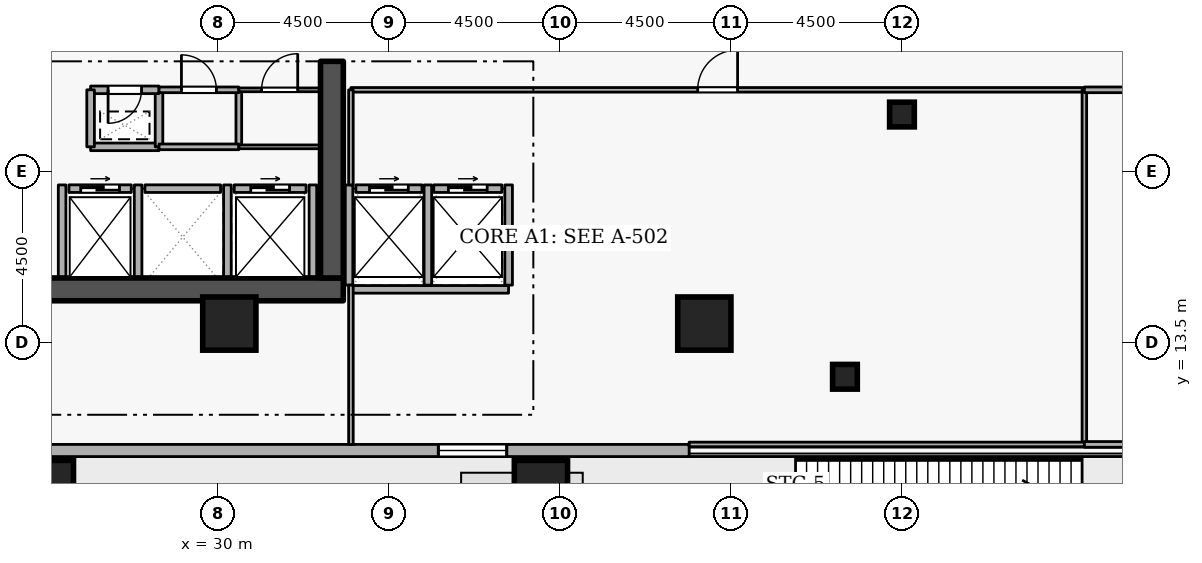
"""IFC4 building model, lengths in metres.
Left out: names, types, materials, properties, quantities, classifications, styles, units other than length and angle.
Written with IfcOpenShell. Run it as: python <this file> out.ifc"""

import sys

from ifc_helpers import new_model, si_unit, direction, frame, frame_2d, origin, origin_2d, place, context, subcontext, project, spatial, rectangle, extrude, element, fill, save


model = new_model("IFC4")
c1 = context("Model", 3, precision=1e-05, world=origin(), true_north=direction((0.0, 1.0)))
c2 = subcontext(c1, "Body", "Model", "MODEL_VIEW")
j1 = project(units=[si_unit("LENGTHUNIT", "METRE"), si_unit("PLANEANGLEUNIT", "RADIAN")], contexts=[c1])
p1 = place(None, origin())
s1 = spatial("IfcSite", under=j1, at=p1, CompositionType="ELEMENT")
p2 = place(p1, origin())
s2 = spatial("IfcBuilding", under=s1, at=p2, CompositionType="ELEMENT")
p3 = place(p2, frame((0.0, 0.0, 18.6)))
s3 = spatial("IfcBuildingStorey", under=s2, at=p3, CompositionType="ELEMENT", Elevation=18.6)
p4 = place(p3, frame((17.7, 14.9, 0.0), z_axis=(0.0, 0.0, 1.0), x_axis=(1.0, 0.0, 0.0)))
e1 = element("IfcWall", 1, at=p4, inside=s3, PredefinedType="SHEAR", context=c2, shape_type="SweptSolid", body=[
    extrude(rectangle(XDim=15.6, YDim=0.6, at=frame_2d((7.8, 0.0))), origin(), (0.0, 0.0, 1.0), 4.5),
])
p5 = place(p3, frame((33.0, 15.2, 0.0), z_axis=(0.0, 0.0, 1.0), x_axis=(0.0, 1.0, 0.0)))
e2 = element("IfcWall", 2, at=p5, inside=s3, PredefinedType="SHEAR", context=c2, shape_type="SweptSolid", body=[
    extrude(rectangle(XDim=5.7, YDim=0.6, at=frame_2d((2.85, 0.0))), origin(), (0.0, 0.0, 1.0), 4.5),
])
for number, where, z_axis, x_axis in (
    (3, (25.5, 9.7, 0.0), (0.0, 0.0, 1.0), (1.0, 0.0, 0.0)),
    (4, (38.5, 9.7, 0.0), (0.0, 0.0, 1.0), (1.0, 0.0, 0.0)),
    (5, (42.8, 14.0, 0.0), (0.0, 0.0, 1.0), (1.0, 0.0, 0.0)),
    (6, (30.3, 14.0, 0.0), (0.0, 0.0, 1.0), (1.0, 0.0, 0.0)),
):
    element("IfcColumn", number, at=place(p3, frame(where, z_axis=z_axis, x_axis=x_axis)), inside=s3, PredefinedType="COLUMN", context=c2, shape_type="SweptSolid", body=[
        extrude(rectangle(XDim=1.4, YDim=1.4, at=origin_2d()), origin(), (0.0, 0.0, 1.0), 4.5),
    ])
for number, where, z_axis, x_axis in (
    (7, (46.5, 12.6, 0.0), (0.0, 0.0, 1.0), (1.0, 0.0, 0.0)),
    (8, (48.0, 19.5, 0.0), (0.0, 0.0, 1.0), (1.0, 0.0, 0.0)),
):
    element("IfcColumn", number, at=place(p3, frame(where, z_axis=z_axis, x_axis=x_axis)), inside=s3, PredefinedType="COLUMN", context=c2, shape_type="SweptSolid", body=[
        extrude(rectangle(XDim=0.65, YDim=0.65, at=origin_2d()), origin(), (0.0, 0.0, 1.0), 4.5),
    ])
p6 = place(p3, frame((3.0, 10.66, 0.0), z_axis=(0.0, 0.0, 1.0), x_axis=(1.0, 0.0, 0.0)))
e9 = element("IfcWall", 9, at=p6, inside=s3, PredefinedType="STANDARD", context=c2, shape_type="SweptSolid", body=[
    extrude(rectangle(XDim=39.4, YDim=0.32, at=frame_2d((19.7, 0.0))), origin(), (0.0, 0.0, 1.0), 3.56),
])
p7 = place(p6, frame((6.2, 0.0, 0.0)))
e10 = element("IfcOpeningElement", 10, at=p7, cuts=e9, PredefinedType="OPENING", context=c2, shape_type="SweptSolid", body=[
    extrude(rectangle(XDim=1.15, YDim=2.1, at=frame_2d((0.575, 1.05))), frame((0.0, 0.17, 0.0), z_axis=(0.0, -1.0, 0.0), x_axis=(1.0, 0.0, 0.0)), (0.0, 0.0, 1.0), 0.34),
])
p8 = place(p6, frame((3.0, 0.0, 0.78)))
e11 = element("IfcOpeningElement", 11, at=p8, cuts=e9, PredefinedType="OPENING", context=c2, shape_type="SweptSolid", body=[
    extrude(rectangle(XDim=1.8, YDim=2.15, at=frame_2d((0.9, 1.075))), frame((0.0, 0.17, 0.0), z_axis=(0.0, -1.0, 0.0), x_axis=(1.0, 0.0, 0.0)), (0.0, 0.0, 1.0), 0.34),
])
p9 = place(p6, frame((12.8, 0.0, 0.78)))
e12 = element("IfcOpeningElement", 12, at=p9, cuts=e9, PredefinedType="OPENING", context=c2, shape_type="SweptSolid", body=[
    extrude(rectangle(XDim=1.8, YDim=2.15, at=frame_2d((0.9, 1.075))), frame((0.0, 0.17, 0.0), z_axis=(0.0, -1.0, 0.0), x_axis=(1.0, 0.0, 0.0)), (0.0, 0.0, 1.0), 0.34),
])
p10 = place(p6, frame((32.8, 0.0, 0.78)))
e13 = element("IfcOpeningElement", 13, at=p10, cuts=e9, PredefinedType="OPENING", context=c2, shape_type="SweptSolid", body=[
    extrude(rectangle(XDim=1.8, YDim=2.15, at=frame_2d((0.9, 1.075))), frame((0.0, 0.17, 0.0), z_axis=(0.0, -1.0, 0.0), x_axis=(1.0, 0.0, 0.0)), (0.0, 0.0, 1.0), 0.34),
])
p11 = place(p3, frame((26.08, 17.55, 0.0), z_axis=(0.0, 0.0, 1.0), x_axis=(1.0, 0.0, 0.0)))
e14 = element("IfcWall", 14, at=p11, inside=s3, PredefinedType="STANDARD", context=c2, shape_type="SweptSolid", body=[
    extrude(rectangle(XDim=1.64, YDim=0.2, at=frame_2d((0.82, 0.0))), origin(), (0.0, 0.0, 1.0), 4.16),
])
p12 = place(p11, frame((0.31, 0.0, 0.0)))
e15 = element("IfcOpeningElement", 15, at=p12, cuts=e14, PredefinedType="OPENING", context=c2, shape_type="SweptSolid", body=[
    extrude(rectangle(XDim=1.02, YDim=2.06, at=frame_2d((0.51, 1.03))), frame((0.0, 0.11, 0.0), z_axis=(0.0, -1.0, 0.0), x_axis=(1.0, 0.0, 0.0)), (0.0, 0.0, 1.0), 0.22),
])
p13 = place(p3, frame((28.08, 17.55, 0.0), z_axis=(0.0, 0.0, 1.0), x_axis=(1.0, 0.0, 0.0)))
e16 = element("IfcWall", 16, at=p13, inside=s3, PredefinedType="STANDARD", context=c2, shape_type="SweptSolid", body=[
    extrude(rectangle(XDim=1.99, YDim=0.2, at=frame_2d((0.995, 0.0))), origin(), (0.0, 0.0, 1.0), 4.16),
])
p14 = place(p3, frame((30.43, 17.55, 0.0), z_axis=(0.0, 0.0, 1.0), x_axis=(1.0, 0.0, 0.0)))
e17 = element("IfcWall", 17, at=p14, inside=s3, PredefinedType="STANDARD", context=c2, shape_type="SweptSolid", body=[
    extrude(rectangle(XDim=1.89, YDim=0.2, at=frame_2d((0.945, 0.0))), origin(), (0.0, 0.0, 1.0), 4.16),
])
p15 = place(p14, frame((0.435, 0.0, 0.0)))
e18 = element("IfcOpeningElement", 18, at=p15, cuts=e17, PredefinedType="OPENING", context=c2, shape_type="SweptSolid", body=[
    extrude(rectangle(XDim=1.02, YDim=2.06, at=frame_2d((0.51, 1.03))), frame((0.0, 0.11, 0.0), z_axis=(0.0, -1.0, 0.0), x_axis=(1.0, 0.0, 0.0)), (0.0, 0.0, 1.0), 0.22),
])
p16 = place(p3, frame((33.63, 17.55, 0.0), z_axis=(0.0, 0.0, 1.0), x_axis=(1.0, 0.0, 0.0)))
e19 = element("IfcWall", 19, at=p16, inside=s3, PredefinedType="STANDARD", context=c2, shape_type="SweptSolid", body=[
    extrude(rectangle(XDim=1.74, YDim=0.2, at=frame_2d((0.87, 0.0))), origin(), (0.0, 0.0, 1.0), 4.16),
])
p17 = place(p16, frame((0.36, 0.0, 0.0)))
e20 = element("IfcOpeningElement", 20, at=p17, cuts=e19, PredefinedType="OPENING", context=c2, shape_type="SweptSolid", body=[
    extrude(rectangle(XDim=1.02, YDim=2.06, at=frame_2d((0.51, 1.03))), frame((0.0, 0.11, 0.0), z_axis=(0.0, -1.0, 0.0), x_axis=(1.0, 0.0, 0.0)), (0.0, 0.0, 1.0), 0.22),
])
p18 = place(p3, frame((35.68, 17.55, 0.0), z_axis=(0.0, 0.0, 1.0), x_axis=(1.0, 0.0, 0.0)))
e21 = element("IfcWall", 21, at=p18, inside=s3, PredefinedType="STANDARD", context=c2, shape_type="SweptSolid", body=[
    extrude(rectangle(XDim=1.79, YDim=0.2, at=frame_2d((0.895, 0.0))), origin(), (0.0, 0.0, 1.0), 4.16),
])
p19 = place(p18, frame((0.385, 0.0, 0.0)))
e22 = element("IfcOpeningElement", 22, at=p19, cuts=e21, PredefinedType="OPENING", context=c2, shape_type="SweptSolid", body=[
    extrude(rectangle(XDim=1.02, YDim=2.06, at=frame_2d((0.51, 1.03))), frame((0.0, 0.11, 0.0), z_axis=(0.0, -1.0, 0.0), x_axis=(1.0, 0.0, 0.0)), (0.0, 0.0, 1.0), 0.22),
])
for number, where, z_axis, x_axis in (
    (23, (27.9, 15.212, 0.0), (0.0, 0.0, 1.0), (0.0, 1.0, 0.0)),
    (24, (25.9, 15.212, 0.0), (0.0, 0.0, 1.0), (0.0, 1.0, 0.0)),
    (25, (30.25, 15.212, 0.0), (0.0, 0.0, 1.0), (0.0, 1.0, 0.0)),
    (26, (32.5, 15.212, 0.0), (0.0, 0.0, 1.0), (0.0, 1.0, 0.0)),
):
    element("IfcWall", number, at=place(p3, frame(where, z_axis=z_axis, x_axis=x_axis)), inside=s3, PredefinedType="STANDARD", context=c2, shape_type="SweptSolid", body=[
        extrude(rectangle(XDim=2.436, YDim=0.2, at=frame_2d((1.218, 0.0))), origin(), (0.0, 0.0, 1.0), 4.16),
    ])
p20 = place(p3, frame((33.452, 14.9, 0.0), z_axis=(0.0, 0.0, 1.0), x_axis=(1.0, 0.0, 0.0)))
e27 = element("IfcWall", 27, at=p20, inside=s3, PredefinedType="STANDARD", context=c2, shape_type="SweptSolid", body=[
    extrude(rectangle(XDim=4.196, YDim=0.2, at=frame_2d((2.098, 0.0))), origin(), (0.0, 0.0, 1.0), 4.16),
])
for number, where, z_axis, x_axis in (
    (28, (35.525, 15.012, 0.0), (0.0, 0.0, 1.0), (0.0, 1.0, 0.0)),
    (29, (33.45, 15.012, 0.0), (0.0, 0.0, 1.0), (0.0, 1.0, 0.0)),
    (30, (37.65, 15.012, 0.0), (0.0, 0.0, 1.0), (0.0, 1.0, 0.0)),
):
    element("IfcWall", number, at=place(p3, frame(where, z_axis=z_axis, x_axis=x_axis)), inside=s3, PredefinedType="STANDARD", context=c2, shape_type="SweptSolid", body=[
        extrude(rectangle(XDim=2.636, YDim=0.2, at=frame_2d((1.318, 0.0))), origin(), (0.0, 0.0, 1.0), 4.16),
    ])
p21 = place(p3, frame((26.65, 18.65, 0.0), z_axis=(0.0, 0.0, 1.0), x_axis=(1.0, 0.0, 0.0)))
e31 = element("IfcWall", 31, at=p21, inside=s3, PredefinedType="STANDARD", context=c2, shape_type="SweptSolid", body=[
    extrude(rectangle(XDim=1.8, YDim=0.2, at=frame_2d((0.9, 0.0))), origin(), (0.0, 0.0, 1.0), 4.16),
])
p22 = place(p3, frame((28.45, 18.65, 0.0), z_axis=(0.0, 0.0, 1.0), x_axis=(0.0, 1.0, 0.0)))
e32 = element("IfcWall", 32, at=p22, inside=s3, PredefinedType="STANDARD", context=c2, shape_type="SweptSolid", body=[
    extrude(rectangle(XDim=1.5, YDim=0.2, at=frame_2d((0.75, 0.0))), origin(), (0.0, 0.0, 1.0), 4.16),
])
p23 = place(p3, frame((28.45, 20.15, 0.0), z_axis=(0.0, 0.0, 1.0), x_axis=(-1.0, 0.0, 0.0)))
e33 = element("IfcWall", 33, at=p23, inside=s3, PredefinedType="STANDARD", context=c2, shape_type="SweptSolid", body=[
    extrude(rectangle(XDim=1.8, YDim=0.2, at=frame_2d((0.9, 0.0))), origin(), (0.0, 0.0, 1.0), 4.16),
])
p24 = place(p23, frame((0.46, 0.0, 0.0)))
e34 = element("IfcOpeningElement", 34, at=p24, cuts=e33, PredefinedType="OPENING", context=c2, shape_type="SweptSolid", body=[
    extrude(rectangle(XDim=0.88, YDim=2.04, at=frame_2d((0.44, 1.02))), frame((0.0, 0.11, 0.0), z_axis=(0.0, -1.0, 0.0), x_axis=(1.0, 0.0, 0.0)), (0.0, 0.0, 1.0), 0.22),
])
p25 = place(p3, frame((26.65, 20.15, 0.0), z_axis=(0.0, 0.0, 1.0), x_axis=(0.0, -1.0, 0.0)))
e35 = element("IfcWall", 35, at=p25, inside=s3, PredefinedType="STANDARD", context=c2, shape_type="SweptSolid", body=[
    extrude(rectangle(XDim=1.5, YDim=0.2, at=frame_2d((0.75, 0.0))), origin(), (0.0, 0.0, 1.0), 4.16),
])
p26 = place(p3, frame((30.55, 20.15, 0.0), z_axis=(0.0, 0.0, 1.0), x_axis=(0.0, -1.0, 0.0)))
e36 = element("IfcWall", 36, at=p26, inside=s3, PredefinedType="PARTITIONING", context=c2, shape_type="SweptSolid", body=[
    extrude(rectangle(XDim=1.5, YDim=0.15, at=frame_2d((0.75, 0.0))), origin(), (0.0, 0.0, 1.0), 4.16),
])
p27 = place(p3, frame((30.55, 18.65, 0.0), z_axis=(0.0, 0.0, 1.0), x_axis=(-1.0, 0.0, 0.0)))
e37 = element("IfcWall", 37, at=p27, inside=s3, PredefinedType="PARTITIONING", context=c2, shape_type="SweptSolid", body=[
    extrude(rectangle(XDim=2.1, YDim=0.15, at=frame_2d((1.05, 0.0))), origin(), (0.0, 0.0, 1.0), 4.16),
])
p28 = place(p3, frame((28.45, 20.15, 0.0), z_axis=(0.0, 0.0, 1.0), x_axis=(1.0, 0.0, 0.0)))
e38 = element("IfcWall", 38, at=p28, inside=s3, PredefinedType="PARTITIONING", context=c2, shape_type="SweptSolid", body=[
    extrude(rectangle(XDim=2.1, YDim=0.15, at=frame_2d((1.05, 0.0))), origin(), (0.0, 0.0, 1.0), 4.16),
])
p29 = place(p28, frame((0.59, 0.0, 0.0)))
e39 = element("IfcOpeningElement", 39, at=p29, cuts=e38, PredefinedType="OPENING", context=c2, shape_type="SweptSolid", body=[
    extrude(rectangle(XDim=0.92, YDim=2.08, at=frame_2d((0.46, 1.04))), frame((0.0, 0.085, 0.0), z_axis=(0.0, -1.0, 0.0), x_axis=(1.0, 0.0, 0.0)), (0.0, 0.0, 1.0), 0.17),
])
p30 = place(p3, frame((32.7, 18.65, 0.0), z_axis=(0.0, 0.0, 1.0), x_axis=(-1.0, 0.0, 0.0)))
e40 = element("IfcWall", 40, at=p30, inside=s3, PredefinedType="PARTITIONING", context=c2, shape_type="SweptSolid", body=[
    extrude(rectangle(XDim=2.15, YDim=0.1, at=frame_2d((1.075, 0.0))), origin(), (0.0, 0.0, 1.0), 4.16),
])
p31 = place(p3, frame((30.55, 20.15, 0.0), z_axis=(0.0, 0.0, 1.0), x_axis=(1.0, 0.0, 0.0)))
e41 = element("IfcWall", 41, at=p31, inside=s3, PredefinedType="PARTITIONING", context=c2, shape_type="SweptSolid", body=[
    extrude(rectangle(XDim=2.15, YDim=0.1, at=frame_2d((1.075, 0.0))), origin(), (0.0, 0.0, 1.0), 4.16),
])
p32 = place(p31, frame((0.6, 0.0, 0.0)))
e42 = element("IfcOpeningElement", 42, at=p32, cuts=e41, PredefinedType="OPENING", context=c2, shape_type="SweptSolid", body=[
    extrude(rectangle(XDim=0.95, YDim=2.1, at=frame_2d((0.475, 1.05))), frame((0.0, 0.06, 0.0), z_axis=(0.0, -1.0, 0.0), x_axis=(1.0, 0.0, 0.0)), (0.0, 0.0, 1.0), 0.12),
])
p33 = place(p3, frame((33.5, 20.15, 0.0), z_axis=(0.0, 0.0, 1.0), x_axis=(1.0, 0.0, 0.0)))
e43 = element("IfcWall", 43, at=p33, inside=s3, PredefinedType="PARTITIONING", context=c2, shape_type="SweptSolid", body=[
    extrude(rectangle(XDim=19.3, YDim=0.12, at=frame_2d((9.65, 0.0))), origin(), (0.0, 0.0, 1.0), 4.16),
])
p34 = place(p33, frame((9.125, 0.0, 0.0)))
e44 = element("IfcOpeningElement", 44, at=p34, cuts=e43, PredefinedType="OPENING", context=c2, shape_type="SweptSolid", body=[
    extrude(rectangle(XDim=1.05, YDim=2.1, at=frame_2d((0.525, 1.05))), frame((0.0, 0.07, 0.0), z_axis=(0.0, -1.0, 0.0), x_axis=(1.0, 0.0, 0.0)), (0.0, 0.0, 1.0), 0.14),
])
p35 = place(p3, frame((52.8, 20.15, 0.0), z_axis=(0.0, 0.0, 1.0), x_axis=(0.0, -1.0, 0.0)))
e45 = element("IfcWall", 45, at=p35, inside=s3, PredefinedType="PARTITIONING", context=c2, shape_type="SweptSolid", body=[
    extrude(rectangle(XDim=9.33, YDim=0.12, at=frame_2d((4.665, 0.0))), origin(), (0.0, 0.0, 1.0), 4.16),
])
p36 = place(p3, frame((52.8, 10.82, 0.0), z_axis=(0.0, 0.0, 1.0), x_axis=(-1.0, 0.0, 0.0)))
e46 = element("IfcWall", 46, at=p36, inside=s3, PredefinedType="PARTITIONING", context=c2, shape_type="SweptSolid", body=[
    extrude(rectangle(XDim=10.4, YDim=0.12, at=frame_2d((5.2, 0.0))), origin(), (0.0, 0.0, 1.0), 4.16),
])
p37 = place(p3, frame((33.5, 10.82, 0.0), z_axis=(0.0, 0.0, 1.0), x_axis=(0.0, 1.0, 0.0)))
e47 = element("IfcWall", 47, at=p37, inside=s3, PredefinedType="PARTITIONING", context=c2, shape_type="SweptSolid", body=[
    extrude(rectangle(XDim=4.192, YDim=0.12, at=frame_2d((2.096, 0.0))), origin(), (0.0, 0.0, 1.0), 4.16),
])
p38 = place(p3, frame((33.5, 17.648, 0.0), z_axis=(0.0, 0.0, 1.0), x_axis=(0.0, 1.0, 0.0)))
e48 = element("IfcWall", 48, at=p38, inside=s3, PredefinedType="PARTITIONING", context=c2, shape_type="SweptSolid", body=[
    extrude(rectangle(XDim=2.502, YDim=0.12, at=frame_2d((1.251, 0.0))), origin(), (0.0, 0.0, 1.0), 4.16),
])
p39 = place(p3, frame((52.8, 20.15, 0.0), z_axis=(0.0, 0.0, 1.0), x_axis=(1.0, 0.0, 0.0)))
e49 = element("IfcWall", 49, at=p39, inside=s3, PredefinedType="PARTITIONING", context=c2, shape_type="SweptSolid", body=[
    extrude(rectangle(XDim=19.25, YDim=0.15, at=frame_2d((9.625, 0.0))), origin(), (0.0, 0.0, 1.0), 4.16),
])
p40 = place(p39, frame((8.975, 0.0, 0.0)))
e50 = element("IfcOpeningElement", 50, at=p40, cuts=e49, PredefinedType="OPENING", context=c2, shape_type="SweptSolid", body=[
    extrude(rectangle(XDim=1.3, YDim=2.12, at=frame_2d((0.65, 1.06))), frame((0.0, 0.085, 0.0), z_axis=(0.0, -1.0, 0.0), x_axis=(1.0, 0.0, 0.0)), (0.0, 0.0, 1.0), 0.17),
])
p41 = place(p3, frame((71.6, 10.82, 0.0), z_axis=(0.0, 0.0, 1.0), x_axis=(-1.0, 0.0, 0.0)))
e51 = element("IfcWall", 51, at=p41, inside=s3, PredefinedType="PARTITIONING", context=c2, shape_type="SweptSolid", body=[
    extrude(rectangle(XDim=18.8, YDim=0.15, at=frame_2d((9.4, 0.0))), origin(), (0.0, 0.0, 1.0), 4.16),
])
p42 = place(p10, origin())
e52 = element("IfcWindow", 52, at=p42, inside=s3, PartitioningType="SINGLE_PANEL", PredefinedType="WINDOW", context=c2, shape_type="SweptSolid", body=[
    extrude(rectangle(XDim=1.8, YDim=2.15, at=frame_2d((0.9, 1.075))), frame((0.0, 0.03, 0.0), z_axis=(0.0, -1.0, 0.0), x_axis=(1.0, 0.0, 0.0)), (0.0, 0.0, 1.0), 0.06),
])
fill(e13, e52)
p43 = place(p12, origin())
e53 = element("IfcDoor", 53, at=p43, inside=s3, OperationType="SLIDING_TO_LEFT", PredefinedType="DOOR", context=c2, shape_type="SweptSolid", body=[
    extrude(rectangle(XDim=1.02, YDim=2.06, at=frame_2d((0.51, 1.03))), frame((0.0, 0.025, 0.0), z_axis=(0.0, -1.0, 0.0), x_axis=(1.0, 0.0, 0.0)), (0.0, 0.0, 1.0), 0.05),
])
fill(e15, e53)
p44 = place(p15, origin())
e54 = element("IfcDoor", 54, at=p44, inside=s3, OperationType="SLIDING_TO_LEFT", PredefinedType="DOOR", context=c2, shape_type="SweptSolid", body=[
    extrude(rectangle(XDim=1.02, YDim=2.06, at=frame_2d((0.51, 1.03))), frame((0.0, 0.025, 0.0), z_axis=(0.0, -1.0, 0.0), x_axis=(1.0, 0.0, 0.0)), (0.0, 0.0, 1.0), 0.05),
])
fill(e18, e54)
p45 = place(p17, origin())
e55 = element("IfcDoor", 55, at=p45, inside=s3, OperationType="SLIDING_TO_LEFT", PredefinedType="DOOR", context=c2, shape_type="SweptSolid", body=[
    extrude(rectangle(XDim=1.02, YDim=2.06, at=frame_2d((0.51, 1.03))), frame((0.0, 0.025, 0.0), z_axis=(0.0, -1.0, 0.0), x_axis=(1.0, 0.0, 0.0)), (0.0, 0.0, 1.0), 0.05),
])
fill(e20, e55)
p46 = place(p19, origin())
e56 = element("IfcDoor", 56, at=p46, inside=s3, OperationType="SLIDING_TO_LEFT", PredefinedType="DOOR", context=c2, shape_type="SweptSolid", body=[
    extrude(rectangle(XDim=1.02, YDim=2.06, at=frame_2d((0.51, 1.03))), frame((0.0, 0.025, 0.0), z_axis=(0.0, -1.0, 0.0), x_axis=(1.0, 0.0, 0.0)), (0.0, 0.0, 1.0), 0.05),
])
fill(e22, e56)
p47 = place(p24, origin())
e57 = element("IfcDoor", 57, at=p47, inside=s3, OperationType="SINGLE_SWING_RIGHT", PredefinedType="DOOR", context=c2, shape_type="SweptSolid", body=[
    extrude(rectangle(XDim=0.88, YDim=2.04, at=frame_2d((0.44, 1.02))), frame((0.0, 0.025, 0.0), z_axis=(0.0, -1.0, 0.0), x_axis=(1.0, 0.0, 0.0)), (0.0, 0.0, 1.0), 0.05),
])
fill(e34, e57)
p48 = place(p29, origin())
e58 = element("IfcDoor", 58, at=p48, inside=s3, OperationType="SINGLE_SWING_LEFT", PredefinedType="DOOR", context=c2, shape_type="SweptSolid", body=[
    extrude(rectangle(XDim=0.92, YDim=2.08, at=frame_2d((0.46, 1.04))), frame((0.0, 0.025, 0.0), z_axis=(0.0, -1.0, 0.0), x_axis=(1.0, 0.0, 0.0)), (0.0, 0.0, 1.0), 0.05),
])
fill(e39, e58)
p49 = place(p32, origin())
e59 = element("IfcDoor", 59, at=p49, inside=s3, OperationType="SINGLE_SWING_RIGHT", PredefinedType="DOOR", context=c2, shape_type="SweptSolid", body=[
    extrude(rectangle(XDim=0.95, YDim=2.1, at=frame_2d((0.475, 1.05))), frame((0.0, 0.025, 0.0), z_axis=(0.0, -1.0, 0.0), x_axis=(1.0, 0.0, 0.0)), (0.0, 0.0, 1.0), 0.05),
])
fill(e42, e59)
p50 = place(p34, origin())
e60 = element("IfcDoor", 60, at=p50, inside=s3, OperationType="SINGLE_SWING_RIGHT", PredefinedType="DOOR", context=c2, shape_type="SweptSolid", body=[
    extrude(rectangle(XDim=1.05, YDim=2.1, at=frame_2d((0.525, 1.05))), frame((0.0, 0.025, 0.0), z_axis=(0.0, -1.0, 0.0), x_axis=(1.0, 0.0, 0.0)), (0.0, 0.0, 1.0), 0.05),
])
fill(e44, e60)
save(model, sys.argv[1])
